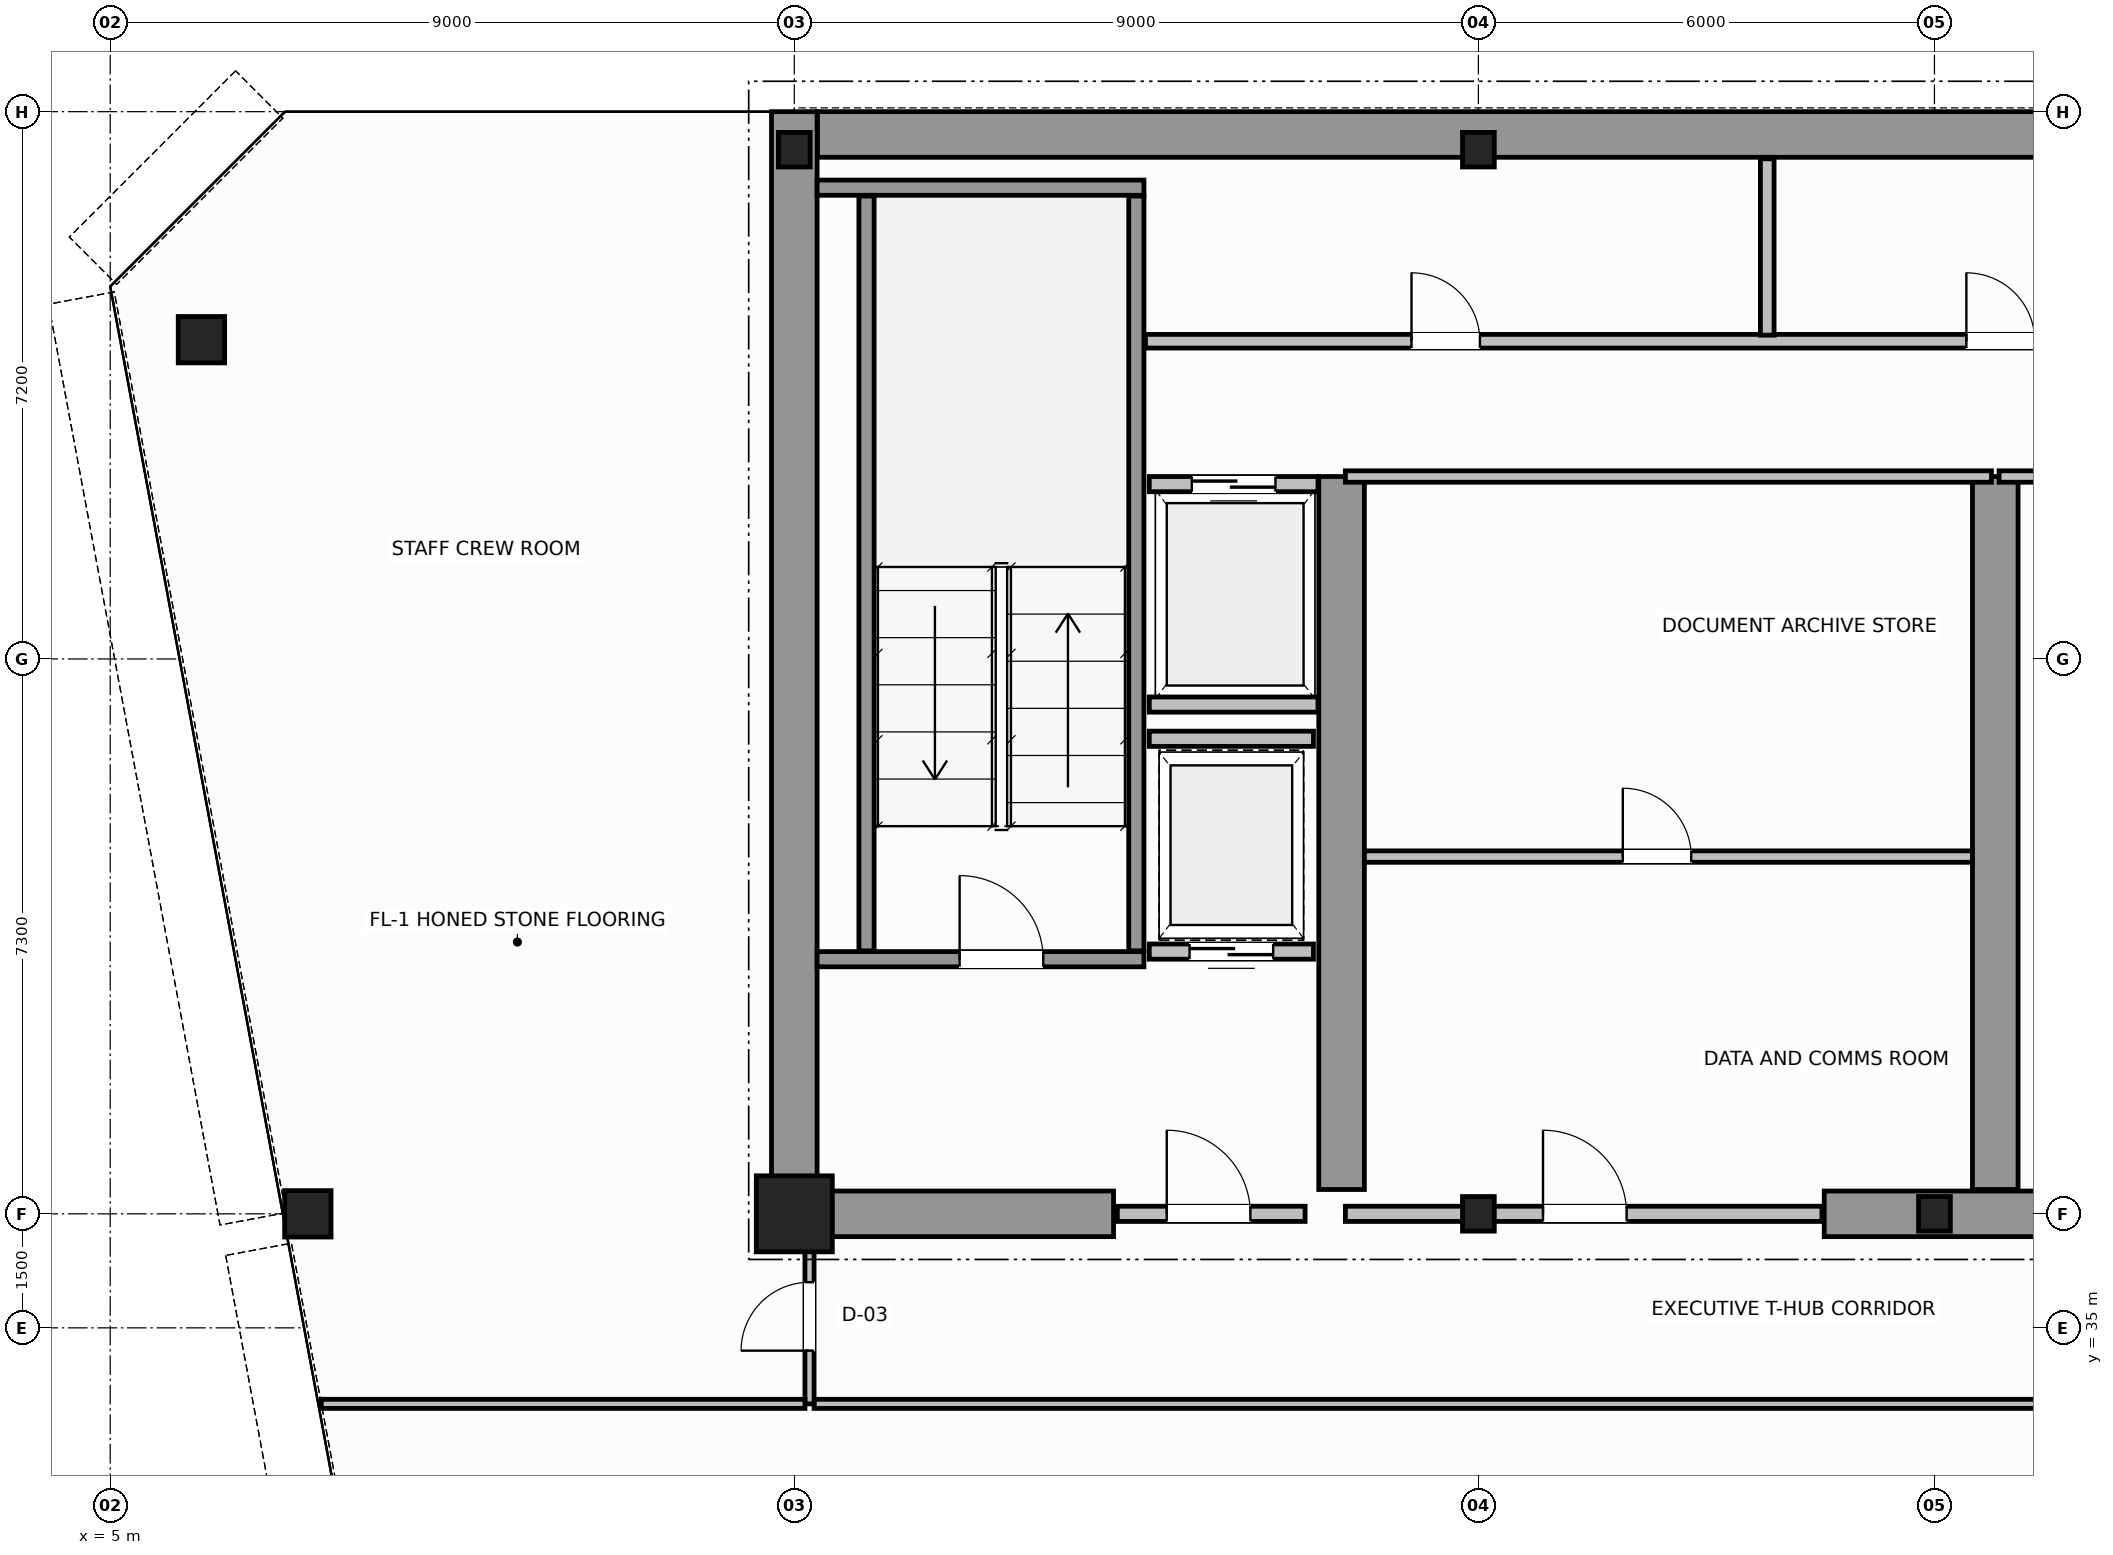
"""IFC4 building model, lengths in metres.
Left out: names, types, materials, properties, quantities, classifications, styles, units other than length and angle.
Written with IfcOpenShell. Run it as: python <this file> out.ifc"""

import sys

from ifc_helpers import new_model, si_unit, direction, frame, frame_2d, origin, origin_2d, place, context, subcontext, project, spatial, rectangle, hollow_circle, i_section, extrude, source, transform, mapped, element, fill, save


model = new_model("IFC4")
c1 = context("Model", 3, precision=1e-05, world=origin(), true_north=direction((0.0, 1.0)))
c2 = subcontext(c1, "Body", "Model", "MODEL_VIEW")
j1 = project(units=[si_unit("LENGTHUNIT", "METRE"), si_unit("PLANEANGLEUNIT", "RADIAN")], contexts=[c1])
p1 = place(None, origin())
s1 = spatial("IfcSite", under=j1, at=p1, CompositionType="ELEMENT")
p2 = place(p1, origin())
s2 = spatial("IfcBuilding", under=s1, at=p2, CompositionType="ELEMENT")
p3 = place(p2, frame((0.0, 0.0, 242.2)))
s3 = spatial("IfcBuildingStorey", under=s2, at=p3, CompositionType="ELEMENT", Elevation=242.2)
m1 = source(origin(), c2, "Body", "SweptSolid", [
    extrude(rectangle(XDim=1.0, YDim=1.0, at=origin_2d()), origin(), (0.0, 0.0, 1.0), 3.8),
])
p4 = place(p3, frame((14.0, 36.5, 0.0), z_axis=(0.0, 0.0, 1.0), x_axis=(1.0, 0.0, 0.0)))
e1 = element("IfcColumn", 1, at=p4, inside=s3, PredefinedType="COLUMN", context=c2, shape_type="MappedRepresentation", body=[
    mapped(m1, transform((0.0, 0.0, 0.0), scale=1.0)),
])
m2 = source(origin(), c2, "Body", "SweptSolid", [
    extrude(i_section(OverallWidth=0.418, OverallDepth=0.455, WebThickness=0.042, FlangeThickness=0.058, FilletRadius=0.015, at=origin_2d()), origin(), (0.0, 0.0, 1.0), 3.8),
])
for number, where, z_axis, x_axis in (
    (2, (23.0, 36.5, 0.0), (0.0, 0.0, 1.0), (1.0, 0.0, 0.0)),
    (3, (29.0, 36.5, 0.0), (0.0, 0.0, 1.0), (1.0, 0.0, 0.0)),
    (4, (14.0, 50.5, 0.0), (0.0, 0.0, 1.0), (1.0, 0.0, 0.0)),
    (5, (23.0, 50.5, 0.0), (0.0, 0.0, 1.0), (1.0, 0.0, 0.0)),
):
    element("IfcColumn", number, at=place(p3, frame(where, z_axis=z_axis, x_axis=x_axis)), inside=s3, PredefinedType="COLUMN", context=c2, shape_type="MappedRepresentation", body=[
        mapped(m2, transform((0.0, 0.0, 0.0), scale=1.0)),
    ])
m3 = source(origin(), c2, "Body", "SweptSolid", [
    extrude(hollow_circle(Radius=0.305, WallThickness=0.03, at=origin_2d()), origin(), (0.0, 0.0, 1.0), 3.8),
])
for number, where, z_axis, x_axis in (
    (6, (6.2, 48.0, 0.0), (0.0, 0.0, 1.0), (1.0, 0.0, 0.0)),
    (7, (7.6, 36.5, 0.0), (0.0, 0.0, 1.0), (1.0, 0.0, 0.0)),
):
    element("IfcColumn", number, at=place(p3, frame(where, z_axis=z_axis, x_axis=x_axis)), inside=s3, PredefinedType="COLUMN", context=c2, shape_type="MappedRepresentation", body=[
        mapped(m3, transform((0.0, 0.0, 0.0), scale=1.0)),
    ])
p5 = place(p3, frame((14.304, 50.7, 0.0), z_axis=(0.0, 0.0, 1.0), x_axis=(1.0, 0.0, 0.0)))
e8 = element("IfcWall", 8, at=p5, inside=s3, PredefinedType="SHEAR", context=c2, shape_type="SweptSolid", body=[
    extrude(rectangle(XDim=19.694, YDim=0.6, at=frame_2d((9.847, 0.0))), origin(), (0.0, 0.0, 1.0), 3.8),
])
p6 = place(p3, frame((14.0, 36.5, 0.0), z_axis=(0.0, 0.0, 1.0), x_axis=(0.0, 1.0, 0.0)))
e9 = element("IfcWall", 9, at=p6, inside=s3, PredefinedType="SHEAR", context=c2, shape_type="SweptSolid", body=[
    extrude(rectangle(XDim=14.5, YDim=0.6, at=frame_2d((7.25, 0.0))), origin(), (0.0, 0.0, 1.0), 3.8),
])
p7 = place(p3, frame((14.32, 36.5, 0.0), z_axis=(0.0, 0.0, 1.0), x_axis=(1.0, 0.0, 0.0)))
e10 = element("IfcWall", 10, at=p7, inside=s3, PredefinedType="SHEAR", context=c2, shape_type="SweptSolid", body=[
    extrude(rectangle(XDim=3.88, YDim=0.6, at=frame_2d((1.94, 0.0))), origin(), (0.0, 0.0, 1.0), 2.58),
])
p8 = place(p3, frame((27.55, 36.5, 0.0), z_axis=(0.0, 0.0, 1.0), x_axis=(1.0, 0.0, 0.0)))
e11 = element("IfcWall", 11, at=p8, inside=s3, PredefinedType="SHEAR", context=c2, shape_type="SweptSolid", body=[
    extrude(rectangle(XDim=4.5, YDim=0.6, at=frame_2d((2.25, 0.0))), origin(), (0.0, 0.0, 1.0), 3.8),
])
for number, where, z_axis, x_axis in (
    (12, (21.2, 36.82, 0.0), (0.0, 0.0, 1.0), (0.0, 1.0, 0.0)),
    (13, (29.8, 36.82, 0.0), (0.0, 0.0, 1.0), (0.0, 1.0, 0.0)),
):
    element("IfcWall", number, at=place(p3, frame(where, z_axis=z_axis, x_axis=x_axis)), inside=s3, PredefinedType="SHEAR", context=c2, shape_type="SweptSolid", body=[
        extrude(rectangle(XDim=9.38, YDim=0.6, at=frame_2d((4.69, 0.0))), origin(), (0.0, 0.0, 1.0), 3.8),
    ])
p9 = place(p3, frame((14.3, 39.85, 0.0), z_axis=(0.0, 0.0, 1.0), x_axis=(1.0, 0.0, 0.0)))
e14 = element("IfcWall", 14, at=p9, inside=s3, PredefinedType="SOLIDWALL", context=c2, shape_type="SweptSolid", body=[
    extrude(rectangle(XDim=4.3, YDim=0.2, at=frame_2d((2.15, 0.0))), origin(), (0.0, 0.0, 1.0), 3.8),
])
p10 = place(p9, frame((1.875, 0.0, 0.0)))
e15 = element("IfcOpeningElement", 15, at=p10, cuts=e14, PredefinedType="OPENING", context=c2, shape_type="SweptSolid", body=[
    extrude(rectangle(XDim=1.1, YDim=2.15, at=frame_2d((0.55, 1.075))), frame((0.0, 0.11, 0.0), z_axis=(0.0, -1.0, 0.0), x_axis=(1.0, 0.0, 0.0)), (0.0, 0.0, 1.0), 0.22),
])
p11 = place(p3, frame((14.3, 50.0, 0.0), z_axis=(0.0, 0.0, 1.0), x_axis=(1.0, 0.0, 0.0)))
e16 = element("IfcWall", 16, at=p11, inside=s3, PredefinedType="SOLIDWALL", context=c2, shape_type="SweptSolid", body=[
    extrude(rectangle(XDim=4.3, YDim=0.2, at=frame_2d((2.15, 0.0))), origin(), (0.0, 0.0, 1.0), 3.8),
])
for number, where, z_axis, x_axis in (
    (17, (14.95, 39.96, 0.0), (0.0, 0.0, 1.0), (0.0, 1.0, 0.0)),
    (18, (18.5, 39.96, 0.0), (0.0, 0.0, 1.0), (0.0, 1.0, 0.0)),
):
    element("IfcWall", number, at=place(p3, frame(where, z_axis=z_axis, x_axis=x_axis)), inside=s3, PredefinedType="SOLIDWALL", context=c2, shape_type="SweptSolid", body=[
        extrude(rectangle(XDim=9.93, YDim=0.2, at=frame_2d((4.965, 0.0))), origin(), (0.0, 0.0, 1.0), 3.8),
    ])
p12 = place(p3, frame((18.25, 36.5, 0.0), z_axis=(0.0, 0.0, 1.0), x_axis=(1.0, 0.0, 0.0)))
e19 = element("IfcWall", 19, at=p12, inside=s3, PredefinedType="SOLIDWALL", context=c2, shape_type="SweptSolid", body=[
    extrude(rectangle(XDim=2.47, YDim=0.2, at=frame_2d((1.235, 0.0))), origin(), (0.0, 0.0, 1.0), 2.57),
])
p13 = place(p12, frame((0.65, 0.0, 0.0)))
e20 = element("IfcOpeningElement", 20, at=p13, cuts=e19, PredefinedType="OPENING", context=c2, shape_type="SweptSolid", body=[
    extrude(rectangle(XDim=1.1, YDim=2.15, at=frame_2d((0.55, 1.075))), frame((0.0, 0.11, 0.0), z_axis=(0.0, -1.0, 0.0), x_axis=(1.0, 0.0, 0.0)), (0.0, 0.0, 1.0), 0.22),
])
p14 = place(p3, frame((18.67, 46.1, 0.0), z_axis=(0.0, 0.0, 1.0), x_axis=(1.0, 0.0, 0.0)))
e21 = element("IfcWall", 21, at=p14, inside=s3, PredefinedType="SOLIDWALL", context=c2, shape_type="SweptSolid", body=[
    extrude(rectangle(XDim=2.22, YDim=0.2, at=frame_2d((1.11, 0.0))), origin(), (0.0, 0.0, 1.0), 3.58),
])
p15 = place(p14, frame((0.56, 0.0, 0.0)))
e22 = element("IfcOpeningElement", 22, at=p15, cuts=e21, PredefinedType="OPENING", context=c2, shape_type="SweptSolid", body=[
    extrude(rectangle(XDim=1.1, YDim=2.15, at=frame_2d((0.55, 1.075))), frame((0.0, 0.11, 0.0), z_axis=(0.0, -1.0, 0.0), x_axis=(1.0, 0.0, 0.0)), (0.0, 0.0, 1.0), 0.22),
])
p16 = place(p3, frame((18.67, 43.2, 0.0), z_axis=(0.0, 0.0, 1.0), x_axis=(1.0, 0.0, 0.0)))
e23 = element("IfcWall", 23, at=p16, inside=s3, PredefinedType="SOLIDWALL", context=c2, shape_type="SweptSolid", body=[
    extrude(rectangle(XDim=2.22, YDim=0.2, at=frame_2d((1.11, 0.0))), origin(), (0.0, 0.0, 1.0), 3.58),
])
p17 = place(p3, frame((18.67, 39.95, 0.0), z_axis=(0.0, 0.0, 1.0), x_axis=(1.0, 0.0, 0.0)))
e24 = element("IfcWall", 24, at=p17, inside=s3, PredefinedType="SOLIDWALL", context=c2, shape_type="SweptSolid", body=[
    extrude(rectangle(XDim=2.16, YDim=0.2, at=frame_2d((1.08, 0.0))), origin(), (0.0, 0.0, 1.0), 3.58),
])
p18 = place(p17, frame((0.53, 0.0, 0.0)))
e25 = element("IfcOpeningElement", 25, at=p18, cuts=e24, PredefinedType="OPENING", context=c2, shape_type="SweptSolid", body=[
    extrude(rectangle(XDim=1.1, YDim=2.15, at=frame_2d((0.55, 1.075))), frame((0.0, 0.11, 0.0), z_axis=(0.0, -1.0, 0.0), x_axis=(1.0, 0.0, 0.0)), (0.0, 0.0, 1.0), 0.22),
])
p19 = place(p3, frame((18.67, 42.75, 0.0), z_axis=(0.0, 0.0, 1.0), x_axis=(1.0, 0.0, 0.0)))
e26 = element("IfcWall", 26, at=p19, inside=s3, PredefinedType="SOLIDWALL", context=c2, shape_type="SweptSolid", body=[
    extrude(rectangle(XDim=2.16, YDim=0.2, at=frame_2d((1.08, 0.0))), origin(), (0.0, 0.0, 1.0), 3.58),
])
p20 = place(p3, frame((21.25, 36.5, 0.0), z_axis=(0.0, 0.0, 1.0), x_axis=(1.0, 0.0, 0.0)))
e27 = element("IfcWall", 27, at=p20, inside=s3, PredefinedType="SOLIDWALL", context=c2, shape_type="SweptSolid", body=[
    extrude(rectangle(XDim=6.27, YDim=0.2, at=frame_2d((3.135, 0.0))), origin(), (0.0, 0.0, 1.0), 2.57),
])
p21 = place(p20, frame((2.6, 0.0, 0.0)))
e28 = element("IfcOpeningElement", 28, at=p21, cuts=e27, PredefinedType="OPENING", context=c2, shape_type="SweptSolid", body=[
    extrude(rectangle(XDim=1.1, YDim=2.15, at=frame_2d((0.55, 1.075))), frame((0.0, 0.11, 0.0), z_axis=(0.0, -1.0, 0.0), x_axis=(1.0, 0.0, 0.0)), (0.0, 0.0, 1.0), 0.22),
])
p22 = place(p3, frame((21.25, 46.2, 0.0), z_axis=(0.0, 0.0, 1.0), x_axis=(1.0, 0.0, 0.0)))
e29 = element("IfcWall", 29, at=p22, inside=s3, PredefinedType="PARTITIONING", context=c2, shape_type="SweptSolid", body=[
    extrude(rectangle(XDim=8.5, YDim=0.15, at=frame_2d((4.25, 0.0))), origin(), (0.0, 0.0, 1.0), 3.58),
])
p23 = place(p3, frame((21.5, 41.2, 0.0), z_axis=(0.0, 0.0, 1.0), x_axis=(1.0, 0.0, 0.0)))
e30 = element("IfcWall", 30, at=p23, inside=s3, PredefinedType="PARTITIONING", context=c2, shape_type="SweptSolid", body=[
    extrude(rectangle(XDim=8.0, YDim=0.15, at=frame_2d((4.0, 0.0))), origin(), (0.0, 0.0, 1.0), 3.58),
])
p24 = place(p23, frame((3.4, 0.0, 0.0)))
e31 = element("IfcOpeningElement", 31, at=p24, cuts=e30, PredefinedType="OPENING", context=c2, shape_type="SweptSolid", body=[
    extrude(rectangle(XDim=0.9, YDim=2.1, at=frame_2d((0.45, 1.05))), frame((0.0, 0.085, 0.0), z_axis=(0.0, -1.0, 0.0), x_axis=(1.0, 0.0, 0.0)), (0.0, 0.0, 1.0), 0.17),
])
p25 = place(p3, frame((29.85, 46.2, 0.0), z_axis=(0.0, 0.0, 1.0), x_axis=(1.0, 0.0, 0.0)))
e32 = element("IfcWall", 32, at=p25, inside=s3, PredefinedType="PARTITIONING", context=c2, shape_type="SweptSolid", body=[
    extrude(rectangle(XDim=8.5, YDim=0.15, at=frame_2d((4.25, 0.0))), origin(), (0.0, 0.0, 1.0), 3.58),
])
p26 = place(p3, frame((18.62, 47.98, 0.0), z_axis=(0.0, 0.0, 1.0), x_axis=(1.0, 0.0, 0.0)))
e33 = element("IfcWall", 33, at=p26, inside=s3, PredefinedType="PLUMBINGWALL", context=c2, shape_type="SweptSolid", body=[
    extrude(rectangle(XDim=20.06, YDim=0.18, at=frame_2d((10.03, 0.0))), origin(), (0.0, 0.0, 1.0), 3.58),
])
p27 = place(p26, frame((3.5, 0.0, 0.0)))
e34 = element("IfcOpeningElement", 34, at=p27, cuts=e33, PredefinedType="OPENING", context=c2, shape_type="SweptSolid", body=[
    extrude(rectangle(XDim=0.9, YDim=2.15, at=frame_2d((0.45, 1.075))), frame((0.0, 0.1, 0.0), z_axis=(0.0, -1.0, 0.0), x_axis=(1.0, 0.0, 0.0)), (0.0, 0.0, 1.0), 0.2),
])
p28 = place(p26, frame((10.8, 0.0, 0.0)))
e35 = element("IfcOpeningElement", 35, at=p28, cuts=e33, PredefinedType="OPENING", context=c2, shape_type="SweptSolid", body=[
    extrude(rectangle(XDim=0.9, YDim=2.15, at=frame_2d((0.45, 1.075))), frame((0.0, 0.1, 0.0), z_axis=(0.0, -1.0, 0.0), x_axis=(1.0, 0.0, 0.0)), (0.0, 0.0, 1.0), 0.2),
])
p29 = place(p26, frame((16.8, 0.0, 0.0)))
e36 = element("IfcOpeningElement", 36, at=p29, cuts=e33, PredefinedType="OPENING", context=c2, shape_type="SweptSolid", body=[
    extrude(rectangle(XDim=0.9, YDim=2.15, at=frame_2d((0.45, 1.075))), frame((0.0, 0.1, 0.0), z_axis=(0.0, -1.0, 0.0), x_axis=(1.0, 0.0, 0.0)), (0.0, 0.0, 1.0), 0.2),
])
p30 = place(p3, frame((26.8, 48.06, 0.0), z_axis=(0.0, 0.0, 1.0), x_axis=(0.0, 1.0, 0.0)))
e37 = element("IfcWall", 37, at=p30, inside=s3, PredefinedType="PLUMBINGWALL", context=c2, shape_type="SweptSolid", body=[
    extrude(rectangle(XDim=2.32, YDim=0.18, at=frame_2d((1.16, 0.0))), origin(), (0.0, 0.0, 1.0), 3.58),
])
p31 = place(p3, frame((14.26, 34.0, 0.0), z_axis=(0.0, 0.0, 1.0), x_axis=(1.0, 0.0, 0.0)))
e38 = element("IfcWall", 38, at=p31, inside=s3, PredefinedType="PARTITIONING", context=c2, shape_type="SweptSolid", body=[
    extrude(rectangle(XDim=17.28, YDim=0.12, at=frame_2d((8.64, 0.0))), origin(), (0.0, 0.0, 1.0), 3.58),
])
p32 = place(p3, frame((14.2, 34.0, 0.0), z_axis=(0.0, 0.0, 1.0), x_axis=(0.0, 1.0, 0.0)))
e39 = element("IfcWall", 39, at=p32, inside=s3, PredefinedType="PARTITIONING", context=c2, shape_type="SweptSolid", body=[
    extrude(rectangle(XDim=2.44, YDim=0.12, at=frame_2d((1.22, 0.0))), origin(), (0.0, 0.0, 1.0), 3.58),
])
p33 = place(p32, frame((0.7, 0.0, 0.0)))
e40 = element("IfcOpeningElement", 40, at=p33, cuts=e39, PredefinedType="OPENING", context=c2, shape_type="SweptSolid", body=[
    extrude(rectangle(XDim=0.9, YDim=2.15, at=frame_2d((0.45, 1.075))), frame((0.0, 0.07, 0.0), z_axis=(0.0, -1.0, 0.0), x_axis=(1.0, 0.0, 0.0)), (0.0, 0.0, 1.0), 0.14),
])
p34 = place(p3, frame((7.777, 34.0, 0.0), z_axis=(0.0, 0.0, 1.0), x_axis=(1.0, 0.0, 0.0)))
e41 = element("IfcWall", 41, at=p34, inside=s3, PredefinedType="PARTITIONING", context=c2, shape_type="SweptSolid", body=[
    extrude(rectangle(XDim=6.363, YDim=0.12, at=frame_2d((3.181, 0.0))), origin(), (0.0, 0.0, 1.0), 3.58),
])
m4 = source(origin(), c2, "Body", "SweptSolid", [
    extrude(rectangle(XDim=1.1, YDim=2.15, at=frame_2d((0.55, 1.075))), frame((0.0, 0.025, 0.0), z_axis=(0.0, -1.0, 0.0), x_axis=(1.0, 0.0, 0.0)), (0.0, 0.0, 1.0), 0.05),
])
p35 = place(p10, origin())
e42 = element("IfcDoor", 42, at=p35, inside=s3, OperationType="SINGLE_SWING_LEFT", PredefinedType="DOOR", context=c2, shape_type="MappedRepresentation", body=[
    mapped(m4, transform((0.0, 0.0, 0.0), scale=1.0)),
])
fill(e15, e42)
p36 = place(p13, origin())
e43 = element("IfcDoor", 43, at=p36, inside=s3, OperationType="SINGLE_SWING_RIGHT", PredefinedType="DOOR", context=c2, shape_type="MappedRepresentation", body=[
    mapped(m4, transform((0.0, 0.0, 0.0), scale=1.0)),
])
fill(e20, e43)
p37 = place(p15, origin())
e44 = element("IfcDoor", 44, at=p37, inside=s3, OperationType="DOUBLE_DOOR_SLIDING", PredefinedType="DOOR", context=c2, shape_type="MappedRepresentation", body=[
    mapped(m4, transform((0.0, 0.0, 0.0), scale=1.0)),
])
fill(e22, e44)
p38 = place(p18, origin())
e45 = element("IfcDoor", 45, at=p38, inside=s3, OperationType="DOUBLE_DOOR_SLIDING", PredefinedType="DOOR", context=c2, shape_type="MappedRepresentation", body=[
    mapped(m4, transform((0.0, 0.0, 0.0), scale=1.0)),
])
fill(e25, e45)
p39 = place(p21, origin())
e46 = element("IfcDoor", 46, at=p39, inside=s3, OperationType="SINGLE_SWING_LEFT", PredefinedType="DOOR", context=c2, shape_type="MappedRepresentation", body=[
    mapped(m4, transform((0.0, 0.0, 0.0), scale=1.0)),
])
fill(e28, e46)
m5 = source(origin(), c2, "Body", "SweptSolid", [
    extrude(rectangle(XDim=0.9, YDim=2.1, at=frame_2d((0.45, 1.05))), frame((0.0, 0.025, 0.0), z_axis=(0.0, -1.0, 0.0), x_axis=(1.0, 0.0, 0.0)), (0.0, 0.0, 1.0), 0.05),
])
p40 = place(p24, origin())
e47 = element("IfcDoor", 47, at=p40, inside=s3, OperationType="SINGLE_SWING_RIGHT", PredefinedType="DOOR", context=c2, shape_type="MappedRepresentation", body=[
    mapped(m5, transform((0.0, 0.0, 0.0), scale=1.0)),
])
fill(e31, e47)
m6 = source(origin(), c2, "Body", "SweptSolid", [
    extrude(rectangle(XDim=0.9, YDim=2.15, at=frame_2d((0.45, 1.075))), frame((0.0, 0.025, 0.0), z_axis=(0.0, -1.0, 0.0), x_axis=(1.0, 0.0, 0.0)), (0.0, 0.0, 1.0), 0.05),
])
p41 = place(p27, origin())
e48 = element("IfcDoor", 48, at=p41, inside=s3, OperationType="SINGLE_SWING_LEFT", PredefinedType="DOOR", context=c2, shape_type="MappedRepresentation", body=[
    mapped(m6, transform((0.0, 0.0, 0.0), scale=1.0)),
])
fill(e34, e48)
p42 = place(p28, origin())
e49 = element("IfcDoor", 49, at=p42, inside=s3, OperationType="SINGLE_SWING_RIGHT", PredefinedType="DOOR", context=c2, shape_type="MappedRepresentation", body=[
    mapped(m6, transform((0.0, 0.0, 0.0), scale=1.0)),
])
fill(e35, e49)
p43 = place(p33, origin())
e50 = element("IfcDoor", 50, at=p43, inside=s3, OperationType="SINGLE_SWING_LEFT", PredefinedType="DOOR", context=c2, shape_type="MappedRepresentation", body=[
    mapped(m6, transform((0.0, 0.0, 0.0), scale=1.0)),
])
fill(e40, e50)
save(model, sys.argv[1])
